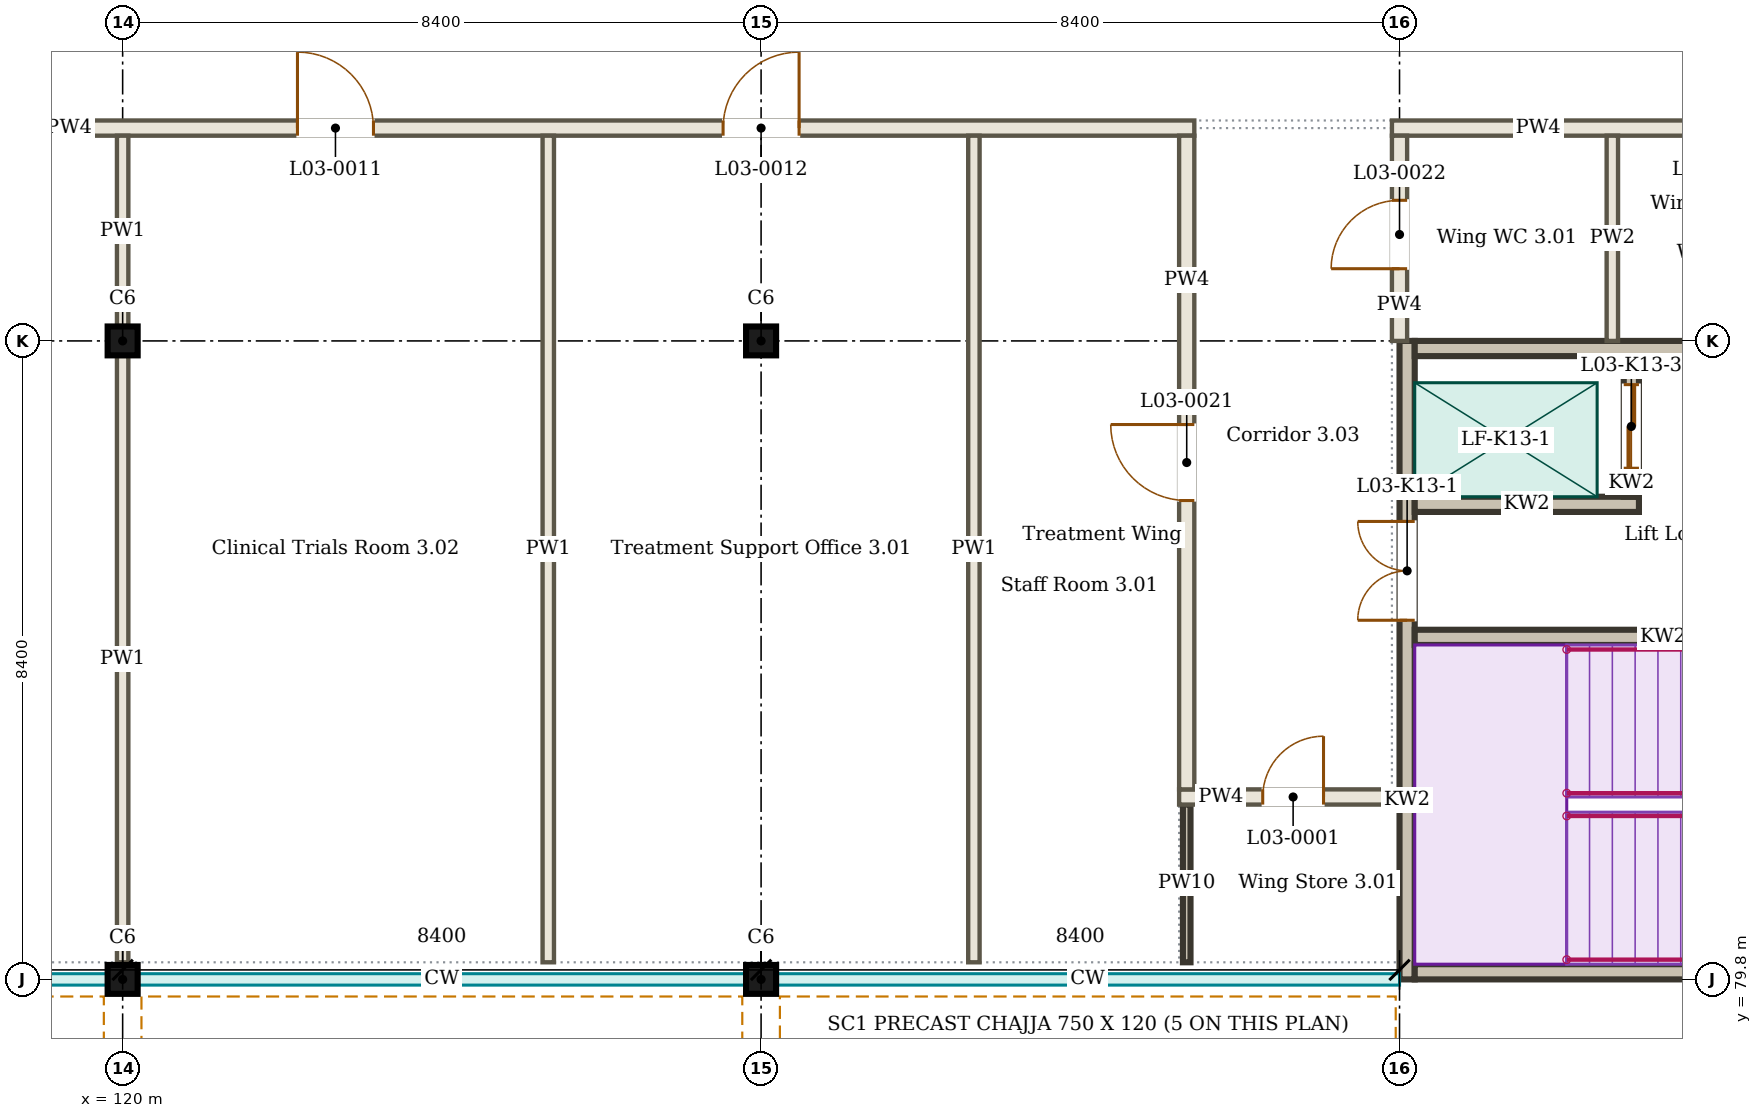
"""IFC4 building model, lengths in metres.
Left out: names, types, materials, properties, quantities, classifications, styles, units other than length and angle.
Written with IfcOpenShell. Run it as: python <this file> out.ifc"""

import sys

from ifc_helpers import new_model, si_unit, direction, frame, frame_2d, origin, origin_2d, place, context, subcontext, project, spatial, rectangle, i_section, extrude, element, fill, save


model = new_model("IFC4")
c1 = context("Model", 3, precision=1e-05, world=origin(), true_north=direction((0.0, 1.0)))
c2 = subcontext(c1, "Body", "Model", "MODEL_VIEW")
j1 = project(units=[si_unit("LENGTHUNIT", "METRE"), si_unit("PLANEANGLEUNIT", "RADIAN")], contexts=[c1])
p1 = place(None, origin())
s1 = spatial("IfcSite", under=j1, at=p1, CompositionType="ELEMENT")
p2 = place(p1, origin())
s2 = spatial("IfcBuilding", under=s1, at=p2, CompositionType="ELEMENT")
p3 = place(p2, frame((0.0, 0.0, 13.5)))
s3 = spatial("IfcBuildingStorey", under=s2, at=p3, CompositionType="ELEMENT", Elevation=13.5)
for number, where, z_axis, x_axis in (
    (1, (120.0, 79.8, 0.0), (0.0, 0.0, 1.0), (1.0, 0.0, 0.0)),
    (2, (128.4, 79.8, 0.0), (0.0, 0.0, 1.0), (1.0, 0.0, 0.0)),
    (3, (120.0, 88.2, 0.0), (0.0, 0.0, 1.0), (1.0, 0.0, 0.0)),
    (4, (128.4, 88.2, 0.0), (0.0, 0.0, 1.0), (1.0, 0.0, 0.0)),
):
    element("IfcColumn", number, at=place(p3, frame(where, z_axis=z_axis, x_axis=x_axis)), inside=s3, PredefinedType="COLUMN", context=c2, shape_type="SweptSolid", body=[
        extrude(i_section(OverallWidth=0.395, OverallDepth=0.38, WebThickness=0.019, FlangeThickness=0.03, FilletRadius=0.027, at=origin_2d()), origin(), (0.0, 0.0, 1.0), 4.5),
    ])
for number, where, z_axis, x_axis in (
    (5, (111.798, 79.64, 3.87), (0.0, 0.0, 1.0), (1.0, 0.0, 0.0)),
    (6, (120.198, 79.64, 3.87), (0.0, 0.0, 1.0), (1.0, 0.0, 0.0)),
):
    element("IfcWall", number, at=place(p3, frame(where, z_axis=z_axis, x_axis=x_axis)), inside=s3, PredefinedType="SOLIDWALL", context=c2, shape_type="SweptSolid", body=[
        extrude(rectangle(XDim=8.005, YDim=0.13, at=frame_2d((4.002, 0.0))), origin(), (0.0, 0.0, 1.0), 0.63),
    ])
p4 = place(p3, frame((128.597, 79.64, 3.87), z_axis=(0.0, 0.0, 1.0), x_axis=(1.0, 0.0, 0.0)))
e7 = element("IfcWall", 7, at=p4, inside=s3, PredefinedType="SOLIDWALL", context=c2, shape_type="SweptSolid", body=[
    extrude(rectangle(XDim=8.203, YDim=0.13, at=frame_2d((4.101, 0.0))), origin(), (0.0, 0.0, 1.0), 0.63),
])
p5 = place(p3, frame((133.9, 82.2, 0.0), z_axis=(0.0, 0.0, 1.0), x_axis=(1.0, 0.0, 0.0)))
e8 = element("IfcWall", 8, at=p5, inside=s3, PredefinedType="PARTITIONING", context=c2, shape_type="SweptSolid", body=[
    extrude(rectangle(XDim=2.9, YDim=0.2, at=frame_2d((1.45, 0.0))), origin(), (0.0, 0.0, 1.0), 3.95),
])
p6 = place(p5, frame((1.1, 0.0, 0.0)))
e9 = element("IfcOpeningElement", 9, at=p6, cuts=e8, PredefinedType="OPENING", context=c2, shape_type="SweptSolid", body=[
    extrude(rectangle(XDim=0.8, YDim=2.1, at=frame_2d((0.4, 1.05))), frame((0.0, 0.11, 0.0), z_axis=(0.0, -1.0, 0.0), x_axis=(1.0, 0.0, 0.0)), (0.0, 0.0, 1.0), 0.22),
])
p7 = place(p3, frame((111.825, 91.0, 0.0), z_axis=(0.0, 0.0, 1.0), x_axis=(1.0, 0.0, 0.0)))
e10 = element("IfcWall", 10, at=p7, inside=s3, PredefinedType="PARTITIONING", context=c2, shape_type="SweptSolid", body=[
    extrude(rectangle(XDim=22.275, YDim=0.2, at=frame_2d((11.138, 0.0))), origin(), (0.0, 0.0, 1.0), 3.8),
])
p8 = place(p7, frame((3.475, 0.0, 0.0)))
e11 = element("IfcOpeningElement", 11, at=p8, cuts=e10, PredefinedType="OPENING", context=c2, shape_type="SweptSolid", body=[
    extrude(rectangle(XDim=1.0, YDim=2.1, at=frame_2d((0.5, 1.05))), frame((0.0, 0.11, 0.0), z_axis=(0.0, -1.0, 0.0), x_axis=(1.0, 0.0, 0.0)), (0.0, 0.0, 1.0), 0.22),
])
p9 = place(p7, frame((10.475, 0.0, 0.0)))
e12 = element("IfcOpeningElement", 12, at=p9, cuts=e10, PredefinedType="OPENING", context=c2, shape_type="SweptSolid", body=[
    extrude(rectangle(XDim=1.0, YDim=2.1, at=frame_2d((0.5, 1.05))), frame((0.0, 0.11, 0.0), z_axis=(0.0, -1.0, 0.0), x_axis=(1.0, 0.0, 0.0)), (0.0, 0.0, 1.0), 0.22),
])
p10 = place(p7, frame((16.075, 0.0, 0.0)))
e13 = element("IfcOpeningElement", 13, at=p10, cuts=e10, PredefinedType="OPENING", context=c2, shape_type="SweptSolid", body=[
    extrude(rectangle(XDim=1.0, YDim=2.1, at=frame_2d((0.5, 1.05))), frame((0.0, 0.11, 0.0), z_axis=(0.0, -1.0, 0.0), x_axis=(1.0, 0.0, 0.0)), (0.0, 0.0, 1.0), 0.22),
])
p11 = place(p3, frame((136.7, 91.0, 0.0), z_axis=(0.0, 0.0, 1.0), x_axis=(1.0, 0.0, 0.0)))
e14 = element("IfcWall", 14, at=p11, inside=s3, PredefinedType="PARTITIONING", context=c2, shape_type="SweptSolid", body=[
    extrude(rectangle(XDim=5.8, YDim=0.2, at=frame_2d((2.9, 0.0))), origin(), (0.0, 0.0, 1.0), 3.8),
])
p12 = place(p11, frame((3.85, 0.0, 0.0)))
e15 = element("IfcOpeningElement", 15, at=p12, cuts=e14, PredefinedType="OPENING", context=c2, shape_type="SweptSolid", body=[
    extrude(rectangle(XDim=0.9, YDim=2.1, at=frame_2d((0.45, 1.05))), frame((0.0, 0.11, 0.0), z_axis=(0.0, -1.0, 0.0), x_axis=(1.0, 0.0, 0.0)), (0.0, 0.0, 1.0), 0.22),
])
p13 = place(p3, frame((120.0, 80.025, 0.0), z_axis=(0.0, 0.0, 1.0), x_axis=(0.0, 1.0, 0.0)))
e16 = element("IfcWall", 16, at=p13, inside=s3, PredefinedType="PARTITIONING", context=c2, shape_type="SweptSolid", body=[
    extrude(rectangle(XDim=7.978, YDim=0.15, at=frame_2d((3.989, 0.0))), origin(), (0.0, 0.0, 1.0), 3.8),
])
p14 = place(p3, frame((120.0, 88.397, 0.0), z_axis=(0.0, 0.0, 1.0), x_axis=(0.0, 1.0, 0.0)))
e17 = element("IfcWall", 17, at=p14, inside=s3, PredefinedType="PARTITIONING", context=c2, shape_type="SweptSolid", body=[
    extrude(rectangle(XDim=2.502, YDim=0.15, at=frame_2d((1.251, 0.0))), origin(), (0.0, 0.0, 1.0), 3.8),
])
for number, where, z_axis, x_axis in (
    (18, (125.6, 80.025, 0.0), (0.0, 0.0, 1.0), (0.0, 1.0, 0.0)),
    (19, (131.2, 80.025, 0.0), (0.0, 0.0, 1.0), (0.0, 1.0, 0.0)),
):
    element("IfcWall", number, at=place(p3, frame(where, z_axis=z_axis, x_axis=x_axis)), inside=s3, PredefinedType="PARTITIONING", context=c2, shape_type="SweptSolid", body=[
        extrude(rectangle(XDim=10.875, YDim=0.15, at=frame_2d((5.438, 0.0))), origin(), (0.0, 0.0, 1.0), 3.8),
    ])
p15 = place(p3, frame((134.0, 80.025, 0.0), z_axis=(0.0, 0.0, 1.0), x_axis=(0.0, 1.0, 0.0)))
e20 = element("IfcWall", 20, at=p15, inside=s3, PredefinedType="SOLIDWALL", context=c2, shape_type="SweptSolid", body=[
    extrude(rectangle(XDim=2.075, YDim=0.1, at=frame_2d((1.038, 0.0))), origin(), (0.0, 0.0, 1.0), 3.95),
])
p16 = place(p3, frame((134.0, 82.3, 0.0), z_axis=(0.0, 0.0, 1.0), x_axis=(0.0, 1.0, 0.0)))
e21 = element("IfcWall", 21, at=p16, inside=s3, PredefinedType="PARTITIONING", context=c2, shape_type="SweptSolid", body=[
    extrude(rectangle(XDim=8.6, YDim=0.2, at=frame_2d((4.3, 0.0))), origin(), (0.0, 0.0, 1.0), 3.8),
])
p17 = place(p16, frame((3.8, 0.0, 0.0)))
e22 = element("IfcOpeningElement", 22, at=p17, cuts=e21, PredefinedType="OPENING", context=c2, shape_type="SweptSolid", body=[
    extrude(rectangle(XDim=1.0, YDim=2.1, at=frame_2d((0.5, 1.05))), frame((0.0, 0.11, 0.0), z_axis=(0.0, -1.0, 0.0), x_axis=(1.0, 0.0, 0.0)), (0.0, 0.0, 1.0), 0.22),
])
p18 = place(p3, frame((136.8, 88.2, 0.0), z_axis=(0.0, 0.0, 1.0), x_axis=(0.0, 1.0, 0.0)))
e23 = element("IfcWall", 23, at=p18, inside=s3, PredefinedType="PARTITIONING", context=c2, shape_type="SweptSolid", body=[
    extrude(rectangle(XDim=2.7, YDim=0.2, at=frame_2d((1.35, 0.0))), origin(), (0.0, 0.0, 1.0), 3.8),
])
p19 = place(p18, frame((0.95, 0.0, 0.0)))
e24 = element("IfcOpeningElement", 24, at=p19, cuts=e23, PredefinedType="OPENING", context=c2, shape_type="SweptSolid", body=[
    extrude(rectangle(XDim=0.9, YDim=2.1, at=frame_2d((0.45, 1.05))), frame((0.0, 0.11, 0.0), z_axis=(0.0, -1.0, 0.0), x_axis=(1.0, 0.0, 0.0)), (0.0, 0.0, 1.0), 0.22),
])
p20 = place(p3, frame((139.6, 88.2, 0.0), z_axis=(0.0, 0.0, 1.0), x_axis=(0.0, 1.0, 0.0)))
e25 = element("IfcWall", 25, at=p20, inside=s3, PredefinedType="PARTITIONING", context=c2, shape_type="SweptSolid", body=[
    extrude(rectangle(XDim=2.7, YDim=0.15, at=frame_2d((1.35, 0.0))), origin(), (0.0, 0.0, 1.0), 3.95),
])
p21 = place(p3, frame((136.9, 79.8, 0.0), z_axis=(0.0, 0.0, 1.0), x_axis=(0.0, 1.0, 0.0)))
e26 = element("IfcWall", 26, at=p21, inside=s3, PredefinedType="SOLIDWALL", context=c2, shape_type="SweptSolid", body=[
    extrude(rectangle(XDim=8.4, YDim=0.2, at=frame_2d((4.2, 0.0))), origin(), (0.0, 0.0, 1.0), 4.5),
])
p22 = place(p21, frame((4.725, 0.0, 0.0)))
e27 = element("IfcOpeningElement", 27, at=p22, cuts=e26, PredefinedType="OPENING", context=c2, shape_type="SweptSolid", body=[
    extrude(rectangle(XDim=1.3, YDim=2.1, at=frame_2d((0.65, 1.05))), frame((0.0, 0.11, 0.0), z_axis=(0.0, -1.0, 0.0), x_axis=(1.0, 0.0, 0.0)), (0.0, 0.0, 1.0), 0.22),
])
for number, where, z_axis, x_axis in (
    (28, (137.0, 79.9, 0.0), (0.0, 0.0, 1.0), (1.0, 0.0, 0.0)),
    (29, (137.0, 88.1, 0.0), (0.0, 0.0, 1.0), (1.0, 0.0, 0.0)),
):
    element("IfcWall", number, at=place(p3, frame(where, z_axis=z_axis, x_axis=x_axis)), inside=s3, PredefinedType="SOLIDWALL", context=c2, shape_type="SweptSolid", body=[
        extrude(rectangle(XDim=7.975, YDim=0.2, at=frame_2d((3.988, 0.0))), origin(), (0.0, 0.0, 1.0), 4.5),
    ])
p23 = place(p3, frame((137.0, 84.3, 0.0), z_axis=(0.0, 0.0, 1.0), x_axis=(1.0, 0.0, 0.0)))
e30 = element("IfcWall", 30, at=p23, inside=s3, PredefinedType="SOLIDWALL", context=c2, shape_type="SweptSolid", body=[
    extrude(rectangle(XDim=7.975, YDim=0.2, at=frame_2d((3.988, 0.0))), origin(), (0.0, 0.0, 1.0), 4.5),
])
p24 = place(p23, frame((6.538, 0.0, 0.0)))
e31 = element("IfcOpeningElement", 31, at=p24, cuts=e30, PredefinedType="OPENING", context=c2, shape_type="SweptSolid", body=[
    extrude(rectangle(XDim=1.1, YDim=2.1, at=frame_2d((0.55, 1.05))), frame((0.0, 0.11, 0.0), z_axis=(0.0, -1.0, 0.0), x_axis=(1.0, 0.0, 0.0)), (0.0, 0.0, 1.0), 0.22),
])
p25 = place(p3, frame((137.0, 86.05, 0.0), z_axis=(0.0, 0.0, 1.0), x_axis=(1.0, 0.0, 0.0)))
e32 = element("IfcWall", 32, at=p25, inside=s3, PredefinedType="SOLIDWALL", context=c2, shape_type="SweptSolid", body=[
    extrude(rectangle(XDim=2.95, YDim=0.2, at=frame_2d((1.475, 0.0))), origin(), (0.0, 0.0, 1.0), 4.5),
])
p26 = place(p3, frame((139.85, 86.15, 0.0), z_axis=(0.0, 0.0, 1.0), x_axis=(0.0, 1.0, 0.0)))
e33 = element("IfcWall", 33, at=p26, inside=s3, PredefinedType="SOLIDWALL", context=c2, shape_type="SweptSolid", body=[
    extrude(rectangle(XDim=1.85, YDim=0.2, at=frame_2d((0.925, 0.0))), origin(), (0.0, 0.0, 1.0), 4.5),
])
p27 = place(p26, frame((0.375, 0.0, 0.0)))
e34 = element("IfcOpeningElement", 34, at=p27, cuts=e33, PredefinedType="OPENING", context=c2, shape_type="SweptSolid", body=[
    extrude(rectangle(XDim=1.1, YDim=2.1, at=frame_2d((0.55, 1.05))), frame((0.0, 0.11, 0.0), z_axis=(0.0, -1.0, 0.0), x_axis=(1.0, 0.0, 0.0)), (0.0, 0.0, 1.0), 0.22),
])
p28 = place(p6, origin())
e35 = element("IfcDoor", 35, at=p28, inside=s3, OperationType="SINGLE_SWING_RIGHT", PredefinedType="DOOR", context=c2, shape_type="SweptSolid", body=[
    extrude(rectangle(XDim=0.8, YDim=2.1, at=frame_2d((0.4, 1.05))), frame((0.0, 0.025, 0.0), z_axis=(0.0, -1.0, 0.0), x_axis=(1.0, 0.0, 0.0)), (0.0, 0.0, 1.0), 0.05),
])
fill(e9, e35)
p29 = place(p9, origin())
e36 = element("IfcDoor", 36, at=p29, inside=s3, OperationType="SINGLE_SWING_LEFT", PredefinedType="DOOR", context=c2, shape_type="SweptSolid", body=[
    extrude(rectangle(XDim=1.0, YDim=2.1, at=frame_2d((0.5, 1.05))), frame((0.0, 0.025, 0.0), z_axis=(0.0, -1.0, 0.0), x_axis=(1.0, 0.0, 0.0)), (0.0, 0.0, 1.0), 0.05),
])
fill(e12, e36)
p30 = place(p10, origin())
e37 = element("IfcDoor", 37, at=p30, inside=s3, OperationType="SINGLE_SWING_RIGHT", PredefinedType="DOOR", context=c2, shape_type="SweptSolid", body=[
    extrude(rectangle(XDim=1.0, YDim=2.1, at=frame_2d((0.5, 1.05))), frame((0.0, 0.025, 0.0), z_axis=(0.0, -1.0, 0.0), x_axis=(1.0, 0.0, 0.0)), (0.0, 0.0, 1.0), 0.05),
])
fill(e13, e37)
p31 = place(p17, origin())
e38 = element("IfcDoor", 38, at=p31, inside=s3, OperationType="SINGLE_SWING_RIGHT", PredefinedType="DOOR", context=c2, shape_type="SweptSolid", body=[
    extrude(rectangle(XDim=1.0, YDim=2.1, at=frame_2d((0.5, 1.05))), frame((0.0, 0.025, 0.0), z_axis=(0.0, -1.0, 0.0), x_axis=(1.0, 0.0, 0.0)), (0.0, 0.0, 1.0), 0.05),
])
fill(e22, e38)
p32 = place(p19, origin())
e39 = element("IfcDoor", 39, at=p32, inside=s3, OperationType="SINGLE_SWING_LEFT", PredefinedType="DOOR", context=c2, shape_type="SweptSolid", body=[
    extrude(rectangle(XDim=0.9, YDim=2.1, at=frame_2d((0.45, 1.05))), frame((0.0, 0.025, 0.0), z_axis=(0.0, -1.0, 0.0), x_axis=(1.0, 0.0, 0.0)), (0.0, 0.0, 1.0), 0.05),
])
fill(e24, e39)
p33 = place(p22, origin())
e40 = element("IfcDoor", 40, at=p33, inside=s3, OperationType="DOUBLE_DOOR_DOUBLE_SWING", PredefinedType="DOOR", context=c2, shape_type="SweptSolid", body=[
    extrude(rectangle(XDim=1.3, YDim=2.1, at=frame_2d((0.65, 1.05))), frame((0.0, 0.025, 0.0), z_axis=(0.0, -1.0, 0.0), x_axis=(1.0, 0.0, 0.0)), (0.0, 0.0, 1.0), 0.05),
])
fill(e27, e40)
p34 = place(p27, origin())
e41 = element("IfcDoor", 41, at=p34, inside=s3, OperationType="DOUBLE_DOOR_SLIDING", PredefinedType="DOOR", context=c2, shape_type="SweptSolid", body=[
    extrude(rectangle(XDim=1.1, YDim=2.1, at=frame_2d((0.55, 1.05))), frame((0.0, 0.025, 0.0), z_axis=(0.0, -1.0, 0.0), x_axis=(1.0, 0.0, 0.0)), (0.0, 0.0, 1.0), 0.05),
])
fill(e34, e41)
save(model, sys.argv[1])
